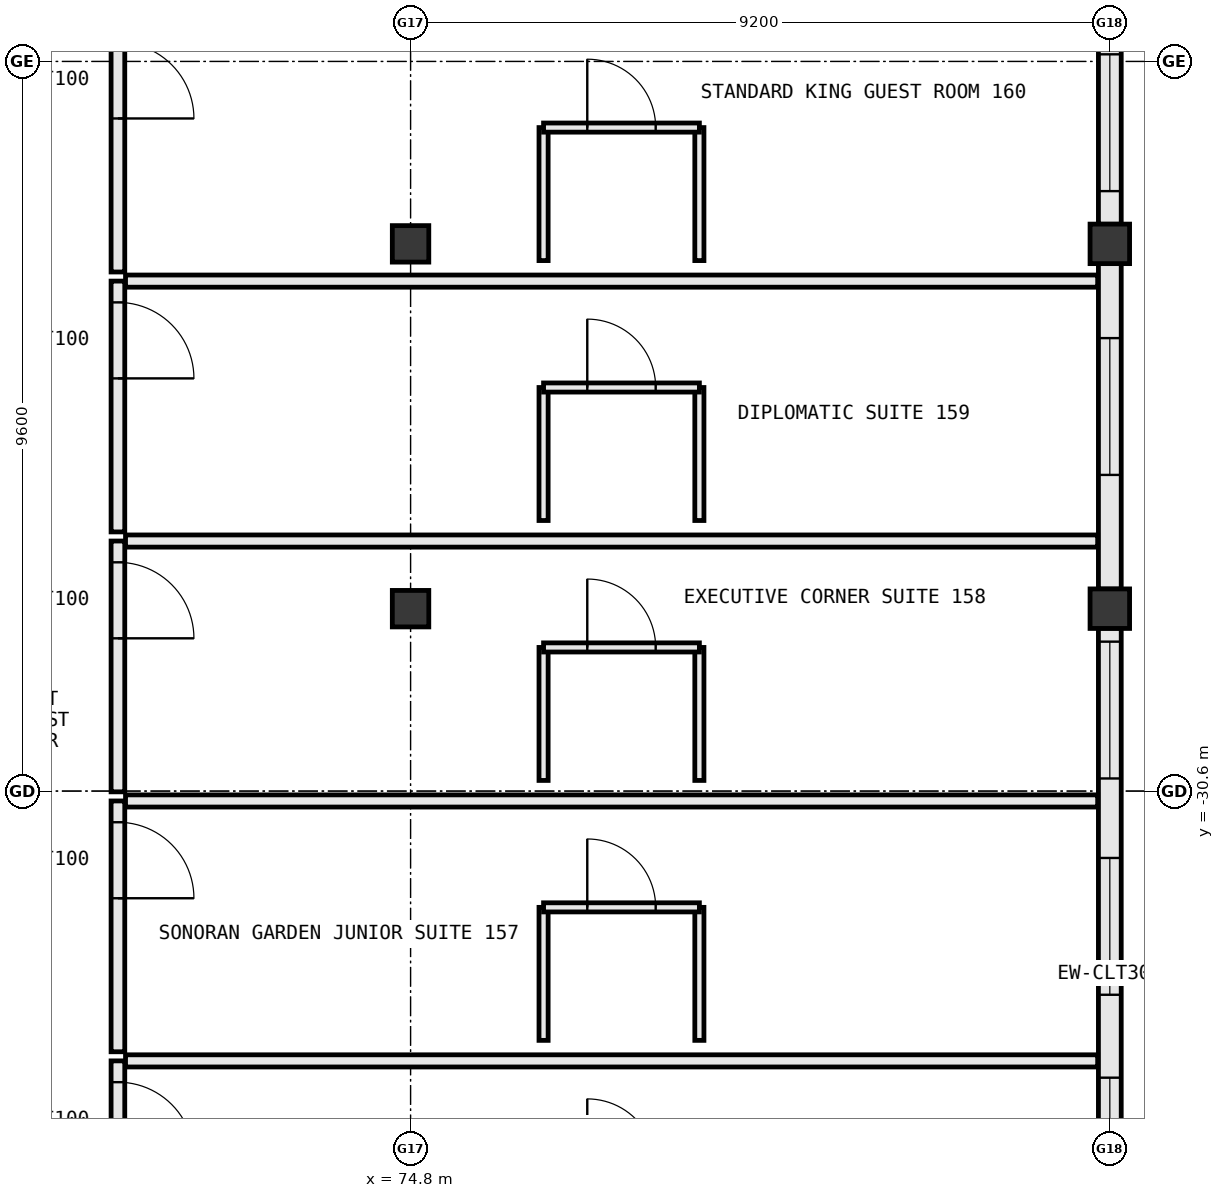
"""IFC4 building model, lengths in metres.
Left out: names, types, materials, properties, quantities, classifications, styles, units other than length and angle.
Written with IfcOpenShell. Run it as: python <this file> out.ifc"""

import sys

from ifc_helpers import new_model, si_unit, direction, frame, frame_2d, origin, origin_2d, place, context, subcontext, project, spatial, rectangle, extrude, element, fill, save


model = new_model("IFC4")
c1 = context("Model", 3, precision=1e-05, world=origin(), true_north=direction((0.0, 1.0)))
c2 = subcontext(c1, "Body", "Model", "MODEL_VIEW")
j1 = project(units=[si_unit("LENGTHUNIT", "METRE"), si_unit("PLANEANGLEUNIT", "RADIAN")], contexts=[c1])
p1 = place(None, origin())
s1 = spatial("IfcSite", under=j1, at=p1, CompositionType="ELEMENT")
p2 = place(p1, origin())
s2 = spatial("IfcBuilding", under=s1, at=p2, CompositionType="ELEMENT")
p3 = place(p2, frame((0.0, 0.0, 23.8)))
s3 = spatial("IfcBuildingStorey", under=s2, at=p3, CompositionType="ELEMENT", Elevation=23.8)
for number, where, z_axis, x_axis in (
    (1, (74.8, -28.2, 0.0), (0.0, 0.0, 1.0), (1.0, 0.0, 0.0)),
    (2, (74.8, -23.4, 0.0), (0.0, 0.0, 1.0), (1.0, 0.0, 0.0)),
):
    element("IfcColumn", number, at=place(p3, frame(where, z_axis=z_axis, x_axis=x_axis)), inside=s3, PredefinedType="COLUMN", context=c2, shape_type="SweptSolid", body=[
        extrude(rectangle(XDim=0.48, YDim=0.48, at=origin_2d()), origin(), (0.0, 0.0, 1.0), 3.8),
    ])
for number, where, z_axis, x_axis in (
    (3, (84.0, -28.2, 0.0), (0.0, 0.0, 1.0), (1.0, 0.0, 0.0)),
    (4, (84.0, -23.4, 0.0), (0.0, 0.0, 1.0), (1.0, 0.0, 0.0)),
):
    element("IfcColumn", number, at=place(p3, frame(where, z_axis=z_axis, x_axis=x_axis)), inside=s3, PredefinedType="COLUMN", context=c2, shape_type="SweptSolid", body=[
        extrude(rectangle(XDim=0.52, YDim=0.52, at=origin_2d()), origin(), (0.0, 0.0, 1.0), 3.8),
    ])
p4 = place(p3, frame((84.0, -37.542, 0.0), z_axis=(0.0, 0.0, 1.0), x_axis=(0.0, 1.0, 0.0)))
e5 = element("IfcWall", 5, at=p4, inside=s3, PredefinedType="STANDARD", context=c2, shape_type="SweptSolid", body=[
    extrude(rectangle(XDim=9.084, YDim=0.3, at=frame_2d((4.542, 0.0))), origin(), (0.0, 0.0, 1.0), 2.965),
])
p5 = place(p4, frame((1.371, 0.0, 0.85)))
e6 = element("IfcOpeningElement", 6, at=p5, cuts=e5, PredefinedType="OPENING", context=c2, shape_type="SweptSolid", body=[
    extrude(rectangle(XDim=1.8, YDim=1.85, at=frame_2d((0.9, 0.925))), frame((0.0, 0.162, 0.0), z_axis=(0.0, -1.0, 0.0), x_axis=(1.0, 0.0, 0.0)), (0.0, 0.0, 1.0), 0.324),
])
p6 = place(p4, frame((4.262, 0.0, 0.85)))
e7 = element("IfcOpeningElement", 7, at=p6, cuts=e5, PredefinedType="OPENING", context=c2, shape_type="SweptSolid", body=[
    extrude(rectangle(XDim=1.8, YDim=1.85, at=frame_2d((0.9, 0.925))), frame((0.0, 0.162, 0.0), z_axis=(0.0, -1.0, 0.0), x_axis=(1.0, 0.0, 0.0)), (0.0, 0.0, 1.0), 0.324),
])
p7 = place(p4, frame((7.108, 0.0, 0.85)))
e8 = element("IfcOpeningElement", 8, at=p7, cuts=e5, PredefinedType="OPENING", context=c2, shape_type="SweptSolid", body=[
    extrude(rectangle(XDim=1.8, YDim=1.85, at=frame_2d((0.9, 0.925))), frame((0.0, 0.162, 0.0), z_axis=(0.0, -1.0, 0.0), x_axis=(1.0, 0.0, 0.0)), (0.0, 0.0, 1.0), 0.324),
])
p8 = place(p3, frame((84.0, -27.942, 0.0), z_axis=(0.0, 0.0, 1.0), x_axis=(0.0, 1.0, 0.0)))
e9 = element("IfcWall", 9, at=p8, inside=s3, PredefinedType="STANDARD", context=c2, shape_type="SweptSolid", body=[
    extrude(rectangle(XDim=4.284, YDim=0.3, at=frame_2d((2.142, 0.0))), origin(), (0.0, 0.0, 1.0), 2.965),
])
p9 = place(p8, frame((1.502, 0.0, 0.85)))
e10 = element("IfcOpeningElement", 10, at=p9, cuts=e9, PredefinedType="OPENING", context=c2, shape_type="SweptSolid", body=[
    extrude(rectangle(XDim=1.8, YDim=1.85, at=frame_2d((0.9, 0.925))), frame((0.0, 0.162, 0.0), z_axis=(0.0, -1.0, 0.0), x_axis=(1.0, 0.0, 0.0)), (0.0, 0.0, 1.0), 0.324),
])
p10 = place(p3, frame((84.0, -23.142, 0.0), z_axis=(0.0, 0.0, 1.0), x_axis=(0.0, 1.0, 0.0)))
e11 = element("IfcWall", 11, at=p10, inside=s3, PredefinedType="STANDARD", context=c2, shape_type="SweptSolid", body=[
    extrude(rectangle(XDim=4.284, YDim=0.3, at=frame_2d((2.142, 0.0))), origin(), (0.0, 0.0, 1.0), 2.965),
])
p11 = place(p10, frame((0.436, 0.0, 0.85)))
e12 = element("IfcOpeningElement", 12, at=p11, cuts=e11, PredefinedType="OPENING", context=c2, shape_type="SweptSolid", body=[
    extrude(rectangle(XDim=1.8, YDim=1.85, at=frame_2d((0.9, 0.925))), frame((0.0, 0.162, 0.0), z_axis=(0.0, -1.0, 0.0), x_axis=(1.0, 0.0, 0.0)), (0.0, 0.0, 1.0), 0.324),
])
p12 = place(p10, frame((2.938, 0.0, 0.85)))
e13 = element("IfcOpeningElement", 13, at=p12, cuts=e11, PredefinedType="OPENING", context=c2, shape_type="SweptSolid", body=[
    extrude(rectangle(XDim=1.2, YDim=1.55, at=frame_2d((0.6, 0.775))), frame((0.0, 0.162, 0.0), z_axis=(0.0, -1.0, 0.0), x_axis=(1.0, 0.0, 0.0)), (0.0, 0.0, 1.0), 0.324),
])
p13 = place(p3, frame((70.95, -34.15, 0.0), z_axis=(0.0, 0.0, 1.0), x_axis=(0.0, -1.0, 0.0)))
e14 = element("IfcWall", 14, at=p13, inside=s3, PredefinedType="PARTITIONING", context=c2, shape_type="SweptSolid", body=[
    extrude(rectangle(XDim=3.3, YDim=0.18, at=frame_2d((1.65, 0.0))), origin(), (0.0, 0.0, 1.0), 3.55),
])
p14 = place(p13, frame((0.28, 0.0, 0.0)))
e15 = element("IfcOpeningElement", 15, at=p14, cuts=e14, PredefinedType="OPENING", context=c2, shape_type="SweptSolid", body=[
    extrude(rectangle(XDim=1.0, YDim=2.2, at=frame_2d((0.5, 1.1))), frame((0.0, 0.102, 0.0), z_axis=(0.0, -1.0, 0.0), x_axis=(1.0, 0.0, 0.0)), (0.0, 0.0, 1.0), 0.204),
])
p15 = place(p3, frame((71.05, -34.15, 0.0), z_axis=(0.0, 0.0, 1.0), x_axis=(1.0, 0.0, 0.0)))
e16 = element("IfcWall", 16, at=p15, inside=s3, PredefinedType="PARTITIONING", context=c2, shape_type="SweptSolid", body=[
    extrude(rectangle(XDim=12.79, YDim=0.16, at=frame_2d((6.395, 0.0))), origin(), (0.0, 0.0, 1.0), 3.55),
])
p16 = place(p3, frame((70.95, -30.73, 0.0), z_axis=(0.0, 0.0, 1.0), x_axis=(0.0, -1.0, 0.0)))
e17 = element("IfcWall", 17, at=p16, inside=s3, PredefinedType="PARTITIONING", context=c2, shape_type="SweptSolid", body=[
    extrude(rectangle(XDim=3.3, YDim=0.18, at=frame_2d((1.65, 0.0))), origin(), (0.0, 0.0, 1.0), 3.55),
])
p17 = place(p16, frame((0.28, 0.0, 0.0)))
e18 = element("IfcOpeningElement", 18, at=p17, cuts=e17, PredefinedType="OPENING", context=c2, shape_type="SweptSolid", body=[
    extrude(rectangle(XDim=1.0, YDim=2.2, at=frame_2d((0.5, 1.1))), frame((0.0, 0.102, 0.0), z_axis=(0.0, -1.0, 0.0), x_axis=(1.0, 0.0, 0.0)), (0.0, 0.0, 1.0), 0.204),
])
p18 = place(p3, frame((71.05, -30.73, 0.0), z_axis=(0.0, 0.0, 1.0), x_axis=(1.0, 0.0, 0.0)))
e19 = element("IfcWall", 19, at=p18, inside=s3, PredefinedType="PARTITIONING", context=c2, shape_type="SweptSolid", body=[
    extrude(rectangle(XDim=12.79, YDim=0.16, at=frame_2d((6.395, 0.0))), origin(), (0.0, 0.0, 1.0), 3.55),
])
for number, where, z_axis, x_axis in (
    (20, (76.55, -33.88, 0.0), (0.0, 0.0, 1.0), (0.0, 1.0, 0.0)),
    (21, (78.6, -33.88, 0.0), (0.0, 0.0, 1.0), (0.0, 1.0, 0.0)),
):
    element("IfcWall", number, at=place(p3, frame(where, z_axis=z_axis, x_axis=x_axis)), inside=s3, PredefinedType="PARTITIONING", context=c2, shape_type="SweptSolid", body=[
        extrude(rectangle(XDim=1.75, YDim=0.12, at=frame_2d((0.875, 0.0))), origin(), (0.0, 0.0, 1.0), 3.55),
    ])
p19 = place(p3, frame((76.55, -32.13, 0.0), z_axis=(0.0, 0.0, 1.0), x_axis=(1.0, 0.0, 0.0)))
e22 = element("IfcWall", 22, at=p19, inside=s3, PredefinedType="PARTITIONING", context=c2, shape_type="SweptSolid", body=[
    extrude(rectangle(XDim=2.05, YDim=0.12, at=frame_2d((1.025, 0.0))), origin(), (0.0, 0.0, 1.0), 3.55),
])
p20 = place(p19, frame((0.575, 0.0, 0.0)))
e23 = element("IfcOpeningElement", 23, at=p20, cuts=e22, PredefinedType="OPENING", context=c2, shape_type="SweptSolid", body=[
    extrude(rectangle(XDim=0.9, YDim=2.15, at=frame_2d((0.45, 1.075))), frame((0.0, 0.072, 0.0), z_axis=(0.0, -1.0, 0.0), x_axis=(1.0, 0.0, 0.0)), (0.0, 0.0, 1.0), 0.144),
])
p21 = place(p3, frame((70.95, -27.31, 0.0), z_axis=(0.0, 0.0, 1.0), x_axis=(0.0, -1.0, 0.0)))
e24 = element("IfcWall", 24, at=p21, inside=s3, PredefinedType="PARTITIONING", context=c2, shape_type="SweptSolid", body=[
    extrude(rectangle(XDim=3.3, YDim=0.18, at=frame_2d((1.65, 0.0))), origin(), (0.0, 0.0, 1.0), 3.55),
])
p22 = place(p21, frame((0.28, 0.0, 0.0)))
e25 = element("IfcOpeningElement", 25, at=p22, cuts=e24, PredefinedType="OPENING", context=c2, shape_type="SweptSolid", body=[
    extrude(rectangle(XDim=1.0, YDim=2.2, at=frame_2d((0.5, 1.1))), frame((0.0, 0.102, 0.0), z_axis=(0.0, -1.0, 0.0), x_axis=(1.0, 0.0, 0.0)), (0.0, 0.0, 1.0), 0.204),
])
p23 = place(p3, frame((71.05, -27.31, 0.0), z_axis=(0.0, 0.0, 1.0), x_axis=(1.0, 0.0, 0.0)))
e26 = element("IfcWall", 26, at=p23, inside=s3, PredefinedType="PARTITIONING", context=c2, shape_type="SweptSolid", body=[
    extrude(rectangle(XDim=12.79, YDim=0.16, at=frame_2d((6.395, 0.0))), origin(), (0.0, 0.0, 1.0), 3.55),
])
for number, where, z_axis, x_axis in (
    (27, (76.55, -30.46, 0.0), (0.0, 0.0, 1.0), (0.0, 1.0, 0.0)),
    (28, (78.6, -30.46, 0.0), (0.0, 0.0, 1.0), (0.0, 1.0, 0.0)),
):
    element("IfcWall", number, at=place(p3, frame(where, z_axis=z_axis, x_axis=x_axis)), inside=s3, PredefinedType="PARTITIONING", context=c2, shape_type="SweptSolid", body=[
        extrude(rectangle(XDim=1.75, YDim=0.12, at=frame_2d((0.875, 0.0))), origin(), (0.0, 0.0, 1.0), 3.55),
    ])
p24 = place(p3, frame((76.55, -28.71, 0.0), z_axis=(0.0, 0.0, 1.0), x_axis=(1.0, 0.0, 0.0)))
e29 = element("IfcWall", 29, at=p24, inside=s3, PredefinedType="PARTITIONING", context=c2, shape_type="SweptSolid", body=[
    extrude(rectangle(XDim=2.05, YDim=0.12, at=frame_2d((1.025, 0.0))), origin(), (0.0, 0.0, 1.0), 3.55),
])
p25 = place(p24, frame((0.575, 0.0, 0.0)))
e30 = element("IfcOpeningElement", 30, at=p25, cuts=e29, PredefinedType="OPENING", context=c2, shape_type="SweptSolid", body=[
    extrude(rectangle(XDim=0.9, YDim=2.15, at=frame_2d((0.45, 1.075))), frame((0.0, 0.072, 0.0), z_axis=(0.0, -1.0, 0.0), x_axis=(1.0, 0.0, 0.0)), (0.0, 0.0, 1.0), 0.144),
])
p26 = place(p3, frame((70.95, -23.89, 0.0), z_axis=(0.0, 0.0, 1.0), x_axis=(0.0, -1.0, 0.0)))
e31 = element("IfcWall", 31, at=p26, inside=s3, PredefinedType="PARTITIONING", context=c2, shape_type="SweptSolid", body=[
    extrude(rectangle(XDim=3.3, YDim=0.18, at=frame_2d((1.65, 0.0))), origin(), (0.0, 0.0, 1.0), 3.55),
])
p27 = place(p26, frame((0.28, 0.0, 0.0)))
e32 = element("IfcOpeningElement", 32, at=p27, cuts=e31, PredefinedType="OPENING", context=c2, shape_type="SweptSolid", body=[
    extrude(rectangle(XDim=1.0, YDim=2.2, at=frame_2d((0.5, 1.1))), frame((0.0, 0.102, 0.0), z_axis=(0.0, -1.0, 0.0), x_axis=(1.0, 0.0, 0.0)), (0.0, 0.0, 1.0), 0.204),
])
p28 = place(p3, frame((71.05, -23.89, 0.0), z_axis=(0.0, 0.0, 1.0), x_axis=(1.0, 0.0, 0.0)))
e33 = element("IfcWall", 33, at=p28, inside=s3, PredefinedType="PARTITIONING", context=c2, shape_type="SweptSolid", body=[
    extrude(rectangle(XDim=12.79, YDim=0.16, at=frame_2d((6.395, 0.0))), origin(), (0.0, 0.0, 1.0), 3.55),
])
for number, where, z_axis, x_axis in (
    (34, (76.55, -27.04, 0.0), (0.0, 0.0, 1.0), (0.0, 1.0, 0.0)),
    (35, (78.6, -27.04, 0.0), (0.0, 0.0, 1.0), (0.0, 1.0, 0.0)),
):
    element("IfcWall", number, at=place(p3, frame(where, z_axis=z_axis, x_axis=x_axis)), inside=s3, PredefinedType="PARTITIONING", context=c2, shape_type="SweptSolid", body=[
        extrude(rectangle(XDim=1.75, YDim=0.12, at=frame_2d((0.875, 0.0))), origin(), (0.0, 0.0, 1.0), 3.55),
    ])
p29 = place(p3, frame((76.55, -25.29, 0.0), z_axis=(0.0, 0.0, 1.0), x_axis=(1.0, 0.0, 0.0)))
e36 = element("IfcWall", 36, at=p29, inside=s3, PredefinedType="PARTITIONING", context=c2, shape_type="SweptSolid", body=[
    extrude(rectangle(XDim=2.05, YDim=0.12, at=frame_2d((1.025, 0.0))), origin(), (0.0, 0.0, 1.0), 3.55),
])
p30 = place(p29, frame((0.575, 0.0, 0.0)))
e37 = element("IfcOpeningElement", 37, at=p30, cuts=e36, PredefinedType="OPENING", context=c2, shape_type="SweptSolid", body=[
    extrude(rectangle(XDim=0.9, YDim=2.15, at=frame_2d((0.45, 1.075))), frame((0.0, 0.072, 0.0), z_axis=(0.0, -1.0, 0.0), x_axis=(1.0, 0.0, 0.0)), (0.0, 0.0, 1.0), 0.144),
])
p31 = place(p3, frame((70.95, -20.47, 0.0), z_axis=(0.0, 0.0, 1.0), x_axis=(0.0, -1.0, 0.0)))
e38 = element("IfcWall", 38, at=p31, inside=s3, PredefinedType="PARTITIONING", context=c2, shape_type="SweptSolid", body=[
    extrude(rectangle(XDim=3.3, YDim=0.18, at=frame_2d((1.65, 0.0))), origin(), (0.0, 0.0, 1.0), 3.55),
])
p32 = place(p31, frame((0.28, 0.0, 0.0)))
e39 = element("IfcOpeningElement", 39, at=p32, cuts=e38, PredefinedType="OPENING", context=c2, shape_type="SweptSolid", body=[
    extrude(rectangle(XDim=1.0, YDim=2.2, at=frame_2d((0.5, 1.1))), frame((0.0, 0.102, 0.0), z_axis=(0.0, -1.0, 0.0), x_axis=(1.0, 0.0, 0.0)), (0.0, 0.0, 1.0), 0.204),
])
for number, where, z_axis, x_axis in (
    (40, (76.55, -23.62, 0.0), (0.0, 0.0, 1.0), (0.0, 1.0, 0.0)),
    (41, (78.6, -23.62, 0.0), (0.0, 0.0, 1.0), (0.0, 1.0, 0.0)),
):
    element("IfcWall", number, at=place(p3, frame(where, z_axis=z_axis, x_axis=x_axis)), inside=s3, PredefinedType="PARTITIONING", context=c2, shape_type="SweptSolid", body=[
        extrude(rectangle(XDim=1.75, YDim=0.12, at=frame_2d((0.875, 0.0))), origin(), (0.0, 0.0, 1.0), 3.55),
    ])
p33 = place(p3, frame((76.55, -21.87, 0.0), z_axis=(0.0, 0.0, 1.0), x_axis=(1.0, 0.0, 0.0)))
e42 = element("IfcWall", 42, at=p33, inside=s3, PredefinedType="PARTITIONING", context=c2, shape_type="SweptSolid", body=[
    extrude(rectangle(XDim=2.05, YDim=0.12, at=frame_2d((1.025, 0.0))), origin(), (0.0, 0.0, 1.0), 3.55),
])
p34 = place(p33, frame((0.575, 0.0, 0.0)))
e43 = element("IfcOpeningElement", 43, at=p34, cuts=e42, PredefinedType="OPENING", context=c2, shape_type="SweptSolid", body=[
    extrude(rectangle(XDim=0.9, YDim=2.15, at=frame_2d((0.45, 1.075))), frame((0.0, 0.072, 0.0), z_axis=(0.0, -1.0, 0.0), x_axis=(1.0, 0.0, 0.0)), (0.0, 0.0, 1.0), 0.144),
])
p35 = place(p5, origin())
e44 = element("IfcWindow", 44, at=p35, inside=s3, PartitioningType="SINGLE_PANEL", PredefinedType="WINDOW", context=c2, shape_type="SweptSolid", body=[
    extrude(rectangle(XDim=1.8, YDim=1.85, at=frame_2d((0.9, 0.925))), frame((0.0, 0.03, 0.0), z_axis=(0.0, -1.0, 0.0), x_axis=(1.0, 0.0, 0.0)), (0.0, 0.0, 1.0), 0.06),
])
fill(e6, e44)
p36 = place(p6, origin())
e45 = element("IfcWindow", 45, at=p36, inside=s3, PartitioningType="SINGLE_PANEL", PredefinedType="WINDOW", context=c2, shape_type="SweptSolid", body=[
    extrude(rectangle(XDim=1.8, YDim=1.85, at=frame_2d((0.9, 0.925))), frame((0.0, 0.03, 0.0), z_axis=(0.0, -1.0, 0.0), x_axis=(1.0, 0.0, 0.0)), (0.0, 0.0, 1.0), 0.06),
])
fill(e7, e45)
p37 = place(p7, origin())
e46 = element("IfcWindow", 46, at=p37, inside=s3, PartitioningType="SINGLE_PANEL", PredefinedType="WINDOW", context=c2, shape_type="SweptSolid", body=[
    extrude(rectangle(XDim=1.8, YDim=1.85, at=frame_2d((0.9, 0.925))), frame((0.0, 0.03, 0.0), z_axis=(0.0, -1.0, 0.0), x_axis=(1.0, 0.0, 0.0)), (0.0, 0.0, 1.0), 0.06),
])
fill(e8, e46)
p38 = place(p9, origin())
e47 = element("IfcWindow", 47, at=p38, inside=s3, PartitioningType="SINGLE_PANEL", PredefinedType="WINDOW", context=c2, shape_type="SweptSolid", body=[
    extrude(rectangle(XDim=1.8, YDim=1.85, at=frame_2d((0.9, 0.925))), frame((0.0, 0.03, 0.0), z_axis=(0.0, -1.0, 0.0), x_axis=(1.0, 0.0, 0.0)), (0.0, 0.0, 1.0), 0.06),
])
fill(e10, e47)
p39 = place(p11, origin())
e48 = element("IfcWindow", 48, at=p39, inside=s3, PartitioningType="SINGLE_PANEL", PredefinedType="WINDOW", context=c2, shape_type="SweptSolid", body=[
    extrude(rectangle(XDim=1.8, YDim=1.85, at=frame_2d((0.9, 0.925))), frame((0.0, 0.03, 0.0), z_axis=(0.0, -1.0, 0.0), x_axis=(1.0, 0.0, 0.0)), (0.0, 0.0, 1.0), 0.06),
])
fill(e12, e48)
p40 = place(p14, origin())
e49 = element("IfcDoor", 49, at=p40, inside=s3, OperationType="SINGLE_SWING_RIGHT", PredefinedType="DOOR", context=c2, shape_type="SweptSolid", body=[
    extrude(rectangle(XDim=1.0, YDim=2.2, at=frame_2d((0.5, 1.1))), frame((0.0, 0.025, 0.0), z_axis=(0.0, -1.0, 0.0), x_axis=(1.0, 0.0, 0.0)), (0.0, 0.0, 1.0), 0.05),
])
fill(e15, e49)
p41 = place(p17, origin())
e50 = element("IfcDoor", 50, at=p41, inside=s3, OperationType="SINGLE_SWING_RIGHT", PredefinedType="DOOR", context=c2, shape_type="SweptSolid", body=[
    extrude(rectangle(XDim=1.0, YDim=2.2, at=frame_2d((0.5, 1.1))), frame((0.0, 0.025, 0.0), z_axis=(0.0, -1.0, 0.0), x_axis=(1.0, 0.0, 0.0)), (0.0, 0.0, 1.0), 0.05),
])
fill(e18, e50)
p42 = place(p20, origin())
e51 = element("IfcDoor", 51, at=p42, inside=s3, OperationType="SINGLE_SWING_LEFT", PredefinedType="DOOR", context=c2, shape_type="SweptSolid", body=[
    extrude(rectangle(XDim=0.9, YDim=2.15, at=frame_2d((0.45, 1.075))), frame((0.0, 0.025, 0.0), z_axis=(0.0, -1.0, 0.0), x_axis=(1.0, 0.0, 0.0)), (0.0, 0.0, 1.0), 0.05),
])
fill(e23, e51)
p43 = place(p22, origin())
e52 = element("IfcDoor", 52, at=p43, inside=s3, OperationType="SINGLE_SWING_RIGHT", PredefinedType="DOOR", context=c2, shape_type="SweptSolid", body=[
    extrude(rectangle(XDim=1.0, YDim=2.2, at=frame_2d((0.5, 1.1))), frame((0.0, 0.025, 0.0), z_axis=(0.0, -1.0, 0.0), x_axis=(1.0, 0.0, 0.0)), (0.0, 0.0, 1.0), 0.05),
])
fill(e25, e52)
p44 = place(p25, origin())
e53 = element("IfcDoor", 53, at=p44, inside=s3, OperationType="SINGLE_SWING_LEFT", PredefinedType="DOOR", context=c2, shape_type="SweptSolid", body=[
    extrude(rectangle(XDim=0.9, YDim=2.15, at=frame_2d((0.45, 1.075))), frame((0.0, 0.025, 0.0), z_axis=(0.0, -1.0, 0.0), x_axis=(1.0, 0.0, 0.0)), (0.0, 0.0, 1.0), 0.05),
])
fill(e30, e53)
p45 = place(p27, origin())
e54 = element("IfcDoor", 54, at=p45, inside=s3, OperationType="SINGLE_SWING_RIGHT", PredefinedType="DOOR", context=c2, shape_type="SweptSolid", body=[
    extrude(rectangle(XDim=1.0, YDim=2.2, at=frame_2d((0.5, 1.1))), frame((0.0, 0.025, 0.0), z_axis=(0.0, -1.0, 0.0), x_axis=(1.0, 0.0, 0.0)), (0.0, 0.0, 1.0), 0.05),
])
fill(e32, e54)
p46 = place(p30, origin())
e55 = element("IfcDoor", 55, at=p46, inside=s3, OperationType="SINGLE_SWING_LEFT", PredefinedType="DOOR", context=c2, shape_type="SweptSolid", body=[
    extrude(rectangle(XDim=0.9, YDim=2.15, at=frame_2d((0.45, 1.075))), frame((0.0, 0.025, 0.0), z_axis=(0.0, -1.0, 0.0), x_axis=(1.0, 0.0, 0.0)), (0.0, 0.0, 1.0), 0.05),
])
fill(e37, e55)
p47 = place(p32, origin())
e56 = element("IfcDoor", 56, at=p47, inside=s3, OperationType="SINGLE_SWING_RIGHT", PredefinedType="DOOR", context=c2, shape_type="SweptSolid", body=[
    extrude(rectangle(XDim=1.0, YDim=2.2, at=frame_2d((0.5, 1.1))), frame((0.0, 0.025, 0.0), z_axis=(0.0, -1.0, 0.0), x_axis=(1.0, 0.0, 0.0)), (0.0, 0.0, 1.0), 0.05),
])
fill(e39, e56)
p48 = place(p34, origin())
e57 = element("IfcDoor", 57, at=p48, inside=s3, OperationType="SINGLE_SWING_LEFT", PredefinedType="DOOR", context=c2, shape_type="SweptSolid", body=[
    extrude(rectangle(XDim=0.9, YDim=2.15, at=frame_2d((0.45, 1.075))), frame((0.0, 0.025, 0.0), z_axis=(0.0, -1.0, 0.0), x_axis=(1.0, 0.0, 0.0)), (0.0, 0.0, 1.0), 0.05),
])
fill(e43, e57)
save(model, sys.argv[1])
